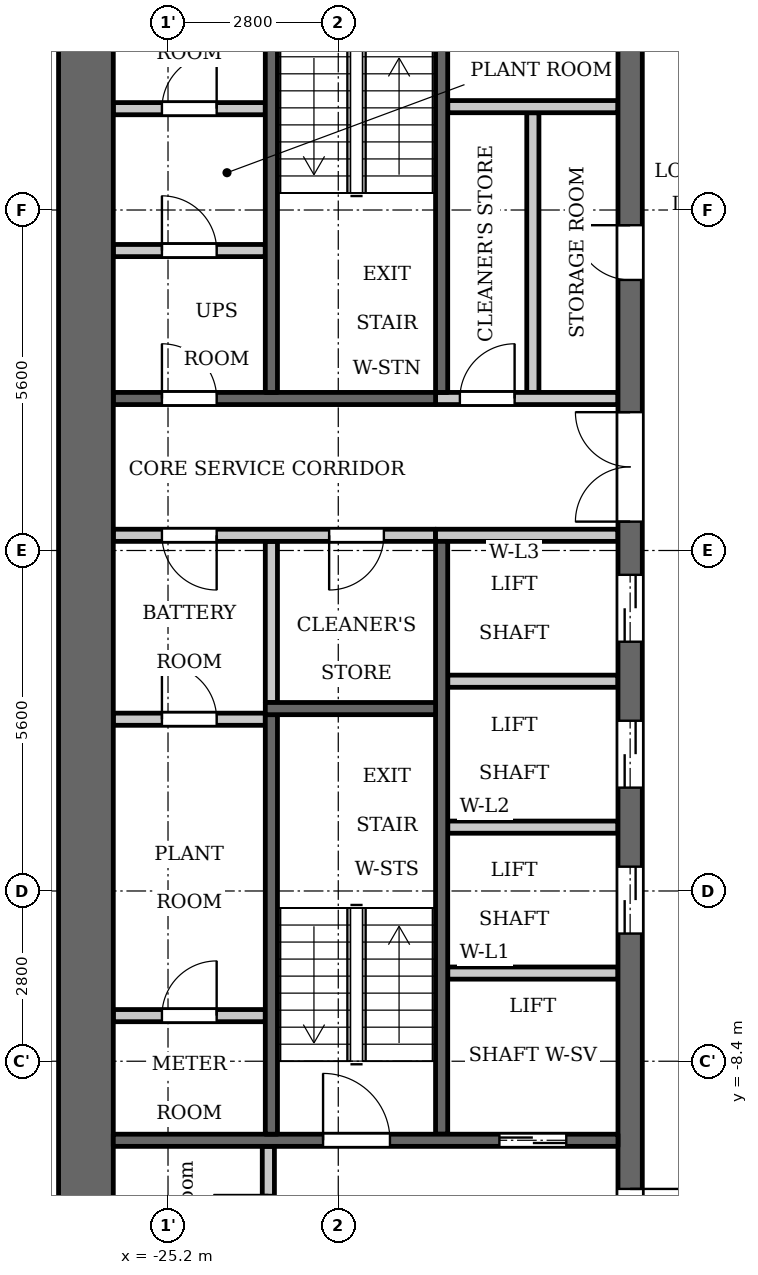
"""IFC4 building model, lengths in metres.
Left out: names, types, materials, properties, quantities, classifications, styles, units other than length and angle.
Written with IfcOpenShell. Run it as: python <this file> out.ifc"""

import sys

from ifc_helpers import new_model, si_unit, direction, frame, frame_2d, origin, place, context, subcontext, project, spatial, rectangle, extrude, element, fill, save


model = new_model("IFC4")
c1 = context("Model", 3, precision=1e-05, world=origin(), true_north=direction((0.0, 1.0)))
c2 = subcontext(c1, "Body", "Model", "MODEL_VIEW")
j1 = project(units=[si_unit("LENGTHUNIT", "METRE"), si_unit("PLANEANGLEUNIT", "RADIAN")], contexts=[c1])
p1 = place(None, origin())
s1 = spatial("IfcSite", under=j1, at=p1, CompositionType="ELEMENT")
p2 = place(p1, origin())
s2 = spatial("IfcBuilding", under=s1, at=p2, CompositionType="ELEMENT")
p3 = place(p2, frame((0.0, 0.0, 44.5)))
s3 = spatial("IfcBuildingStorey", under=s2, at=p3, CompositionType="ELEMENT", Elevation=44.5)
p4 = place(p3, frame((-23.5, -2.5, 0.0), z_axis=(0.0, 0.0, 1.0), x_axis=(0.0, 1.0, 0.0)))
e1 = element("IfcWall", 1, at=p4, inside=s3, PredefinedType="PARTITIONING", context=c2, shape_type="SweptSolid", body=[
    extrude(rectangle(XDim=2.65, YDim=0.2, at=frame_2d((1.325, 0.0))), origin(), (0.0, 0.0, 1.0), 3.2),
])
p5 = place(p3, frame((-20.7, 2.6, 0.0), z_axis=(0.0, 0.0, 1.0), x_axis=(0.0, 1.0, 0.0)))
e2 = element("IfcWall", 2, at=p5, inside=s3, PredefinedType="SHEAR", context=c2, shape_type="SweptSolid", body=[
    extrude(rectangle(XDim=7.0, YDim=0.2, at=frame_2d((3.5, 0.0))), origin(), (0.0, 0.0, 1.0), 3.2),
])
p6 = place(p3, frame((-20.7, -9.6, 0.0), z_axis=(0.0, 0.0, 1.0), x_axis=(0.0, 1.0, 0.0)))
e3 = element("IfcWall", 3, at=p6, inside=s3, PredefinedType="SHEAR", context=c2, shape_type="SweptSolid", body=[
    extrude(rectangle(XDim=9.75, YDim=0.2, at=frame_2d((4.875, 0.0))), origin(), (0.0, 0.0, 1.0), 3.2),
])
p7 = place(p3, frame((-20.8, 2.5, 0.0), z_axis=(0.0, 0.0, 1.0), x_axis=(-1.0, 0.0, 0.0)))
e4 = element("IfcWall", 4, at=p7, inside=s3, PredefinedType="SHEAR", context=c2, shape_type="SweptSolid", body=[
    extrude(rectangle(XDim=5.3, YDim=0.2, at=frame_2d((2.65, 0.0))), origin(), (0.0, 0.0, 1.0), 3.2),
])
p8 = place(p7, frame((3.6, 0.0, 0.0)))
e5 = element("IfcOpeningElement", 5, at=p8, cuts=e4, PredefinedType="OPENING", context=c2, shape_type="SweptSolid", body=[
    extrude(rectangle(XDim=0.9, YDim=2.1, at=frame_2d((0.45, 1.05))), frame((0.0, 0.11, 0.0), z_axis=(0.0, -1.0, 0.0), x_axis=(1.0, 0.0, 0.0)), (0.0, 0.0, 1.0), 0.22),
])
p9 = place(p3, frame((-20.8, 0.25, 0.0), z_axis=(0.0, 0.0, 1.0), x_axis=(-1.0, 0.0, 0.0)))
e6 = element("IfcWall", 6, at=p9, inside=s3, PredefinedType="PARTITIONING", context=c2, shape_type="SweptSolid", body=[
    extrude(rectangle(XDim=5.3, YDim=0.2, at=frame_2d((2.65, 0.0))), origin(), (0.0, 0.0, 1.0), 3.2),
])
p10 = place(p9, frame((0.85, 0.0, 0.0)))
e7 = element("IfcOpeningElement", 7, at=p10, cuts=e6, PredefinedType="OPENING", context=c2, shape_type="SweptSolid", body=[
    extrude(rectangle(XDim=0.9, YDim=2.1, at=frame_2d((0.45, 1.05))), frame((0.0, 0.11, 0.0), z_axis=(0.0, -1.0, 0.0), x_axis=(1.0, 0.0, 0.0)), (0.0, 0.0, 1.0), 0.22),
])
p11 = place(p9, frame((3.6, 0.0, 0.0)))
e8 = element("IfcOpeningElement", 8, at=p11, cuts=e6, PredefinedType="OPENING", context=c2, shape_type="SweptSolid", body=[
    extrude(rectangle(XDim=0.9, YDim=2.1, at=frame_2d((0.45, 1.05))), frame((0.0, 0.11, 0.0), z_axis=(0.0, -1.0, 0.0), x_axis=(1.0, 0.0, 0.0)), (0.0, 0.0, 1.0), 0.22),
])
p12 = place(p3, frame((-19.2, 2.6, 0.0), z_axis=(0.0, 0.0, 1.0), x_axis=(0.0, 1.0, 0.0)))
e9 = element("IfcWall", 9, at=p12, inside=s3, PredefinedType="PARTITIONING", context=c2, shape_type="SweptSolid", body=[
    extrude(rectangle(XDim=4.6, YDim=0.2, at=frame_2d((2.3, 0.0))), origin(), (0.0, 0.0, 1.0), 3.2),
])
p13 = place(p3, frame((-17.6, -12.3, 0.0), z_axis=(0.0, 0.0, 1.0), x_axis=(0.0, 1.0, 0.0)))
e10 = element("IfcWall", 10, at=p13, inside=s3, PredefinedType="SHEAR", context=c2, shape_type="SweptSolid", body=[
    extrude(rectangle(XDim=24.6, YDim=0.4, at=frame_2d((12.3, 0.0))), origin(), (0.0, 0.0, 1.0), 3.2),
])
p14 = place(p13, frame((6.0, 0.0, 0.0)))
e11 = element("IfcOpeningElement", 11, at=p14, cuts=e10, PredefinedType="OPENING", context=c2, shape_type="SweptSolid", body=[
    extrude(rectangle(XDim=1.1, YDim=2.1, at=frame_2d((0.55, 1.05))), frame((0.0, 0.21, 0.0), z_axis=(0.0, -1.0, 0.0), x_axis=(1.0, 0.0, 0.0)), (0.0, 0.0, 1.0), 0.42),
])
p15 = place(p13, frame((8.4, 0.0, 0.0)))
e12 = element("IfcOpeningElement", 12, at=p15, cuts=e10, PredefinedType="OPENING", context=c2, shape_type="SweptSolid", body=[
    extrude(rectangle(XDim=1.1, YDim=2.1, at=frame_2d((0.55, 1.05))), frame((0.0, 0.21, 0.0), z_axis=(0.0, -1.0, 0.0), x_axis=(1.0, 0.0, 0.0)), (0.0, 0.0, 1.0), 0.42),
])
p16 = place(p13, frame((10.8, 0.0, 0.0)))
e13 = element("IfcOpeningElement", 13, at=p16, cuts=e10, PredefinedType="OPENING", context=c2, shape_type="SweptSolid", body=[
    extrude(rectangle(XDim=1.1, YDim=2.1, at=frame_2d((0.55, 1.05))), frame((0.0, 0.21, 0.0), z_axis=(0.0, -1.0, 0.0), x_axis=(1.0, 0.0, 0.0)), (0.0, 0.0, 1.0), 0.42),
])
p17 = place(p13, frame((16.75, 0.0, 0.0)))
e14 = element("IfcOpeningElement", 14, at=p17, cuts=e10, PredefinedType="OPENING", context=c2, shape_type="SweptSolid", body=[
    extrude(rectangle(XDim=0.9, YDim=2.1, at=frame_2d((0.45, 1.05))), frame((0.0, 0.21, 0.0), z_axis=(0.0, -1.0, 0.0), x_axis=(1.0, 0.0, 0.0)), (0.0, 0.0, 1.0), 0.42),
])
p18 = place(p13, frame((22.8, 0.0, 0.0)))
e15 = element("IfcOpeningElement", 15, at=p18, cuts=e10, PredefinedType="OPENING", context=c2, shape_type="SweptSolid", body=[
    extrude(rectangle(XDim=1.1, YDim=2.1, at=frame_2d((0.55, 1.05))), frame((0.0, 0.21, 0.0), z_axis=(0.0, -1.0, 0.0), x_axis=(1.0, 0.0, 0.0)), (0.0, 0.0, 1.0), 0.42),
])
p19 = place(p13, frame((0.7, 0.0, 0.0)))
e16 = element("IfcOpeningElement", 16, at=p19, cuts=e10, PredefinedType="OPENING", context=c2, shape_type="SweptSolid", body=[
    extrude(rectangle(XDim=1.1, YDim=2.1, at=frame_2d((0.55, 1.05))), frame((0.0, 0.21, 0.0), z_axis=(0.0, -1.0, 0.0), x_axis=(1.0, 0.0, 0.0)), (0.0, 0.0, 1.0), 0.42),
])
p20 = place(p13, frame((12.775, 0.0, 0.0)))
e17 = element("IfcOpeningElement", 17, at=p20, cuts=e10, PredefinedType="OPENING", context=c2, shape_type="SweptSolid", body=[
    extrude(rectangle(XDim=1.8, YDim=2.1, at=frame_2d((0.9, 1.05))), frame((0.0, 0.21, 0.0), z_axis=(0.0, -1.0, 0.0), x_axis=(1.0, 0.0, 0.0)), (0.0, 0.0, 1.0), 0.42),
])
p21 = place(p3, frame((-26.55, -12.3, 0.0), z_axis=(0.0, 0.0, 1.0), x_axis=(0.0, 1.0, 0.0)))
e18 = element("IfcWall", 18, at=p21, inside=s3, PredefinedType="SHEAR", context=c2, shape_type="SweptSolid", body=[
    extrude(rectangle(XDim=24.6, YDim=0.9, at=frame_2d((12.3, 0.0))), origin(), (0.0, 0.0, 1.0), 3.2),
])
p22 = place(p3, frame((-23.55, -12.3, 0.0), z_axis=(0.0, 0.0, 1.0), x_axis=(0.0, 1.0, 0.0)))
e19 = element("IfcWall", 19, at=p22, inside=s3, PredefinedType="PARTITIONING", context=c2, shape_type="SweptSolid", body=[
    extrude(rectangle(XDim=2.5, YDim=0.2, at=frame_2d((1.25, 0.0))), origin(), (0.0, 0.0, 1.0), 3.2),
])
p23 = place(p22, frame((0.8, 0.0, 0.0)))
e20 = element("IfcOpeningElement", 20, at=p23, cuts=e19, PredefinedType="OPENING", context=c2, shape_type="SweptSolid", body=[
    extrude(rectangle(XDim=0.9, YDim=2.1, at=frame_2d((0.45, 1.05))), frame((0.0, 0.11, 0.0), z_axis=(0.0, -1.0, 0.0), x_axis=(1.0, 0.0, 0.0)), (0.0, 0.0, 1.0), 0.22),
])
p24 = place(p3, frame((-23.6, -7.65, 0.0), z_axis=(0.0, 0.0, 1.0), x_axis=(-1.0, 0.0, 0.0)))
e21 = element("IfcWall", 21, at=p24, inside=s3, PredefinedType="PARTITIONING", context=c2, shape_type="SweptSolid", body=[
    extrude(rectangle(XDim=2.5, YDim=0.2, at=frame_2d((1.25, 0.0))), origin(), (0.0, 0.0, 1.0), 3.2),
])
p25 = place(p24, frame((0.8, 0.0, 0.0)))
e22 = element("IfcOpeningElement", 22, at=p25, cuts=e21, PredefinedType="OPENING", context=c2, shape_type="SweptSolid", body=[
    extrude(rectangle(XDim=0.9, YDim=2.1, at=frame_2d((0.45, 1.05))), frame((0.0, 0.11, 0.0), z_axis=(0.0, -1.0, 0.0), x_axis=(1.0, 0.0, 0.0)), (0.0, 0.0, 1.0), 0.22),
])
p26 = place(p3, frame((-23.6, -2.775, 0.0), z_axis=(0.0, 0.0, 1.0), x_axis=(-1.0, 0.0, 0.0)))
e23 = element("IfcWall", 23, at=p26, inside=s3, PredefinedType="PARTITIONING", context=c2, shape_type="SweptSolid", body=[
    extrude(rectangle(XDim=2.5, YDim=0.2, at=frame_2d((1.25, 0.0))), origin(), (0.0, 0.0, 1.0), 3.2),
])
p27 = place(p26, frame((0.8, 0.0, 0.0)))
e24 = element("IfcOpeningElement", 24, at=p27, cuts=e23, PredefinedType="OPENING", context=c2, shape_type="SweptSolid", body=[
    extrude(rectangle(XDim=0.9, YDim=2.1, at=frame_2d((0.45, 1.05))), frame((0.0, 0.11, 0.0), z_axis=(0.0, -1.0, 0.0), x_axis=(1.0, 0.0, 0.0)), (0.0, 0.0, 1.0), 0.22),
])
p28 = place(p3, frame((-23.6, 4.933, 0.0), z_axis=(0.0, 0.0, 1.0), x_axis=(-1.0, 0.0, 0.0)))
e25 = element("IfcWall", 25, at=p28, inside=s3, PredefinedType="PARTITIONING", context=c2, shape_type="SweptSolid", body=[
    extrude(rectangle(XDim=2.5, YDim=0.2, at=frame_2d((1.25, 0.0))), origin(), (0.0, 0.0, 1.0), 3.2),
])
p29 = place(p28, frame((0.8, 0.0, 0.0)))
e26 = element("IfcOpeningElement", 26, at=p29, cuts=e25, PredefinedType="OPENING", context=c2, shape_type="SweptSolid", body=[
    extrude(rectangle(XDim=0.9, YDim=2.1, at=frame_2d((0.45, 1.05))), frame((0.0, 0.11, 0.0), z_axis=(0.0, -1.0, 0.0), x_axis=(1.0, 0.0, 0.0)), (0.0, 0.0, 1.0), 0.22),
])
p30 = place(p3, frame((-23.6, 7.267, 0.0), z_axis=(0.0, 0.0, 1.0), x_axis=(-1.0, 0.0, 0.0)))
e27 = element("IfcWall", 27, at=p30, inside=s3, PredefinedType="PARTITIONING", context=c2, shape_type="SweptSolid", body=[
    extrude(rectangle(XDim=2.5, YDim=0.2, at=frame_2d((1.25, 0.0))), origin(), (0.0, 0.0, 1.0), 3.2),
])
p31 = place(p30, frame((0.8, 0.0, 0.0)))
e28 = element("IfcOpeningElement", 28, at=p31, cuts=e27, PredefinedType="OPENING", context=c2, shape_type="SweptSolid", body=[
    extrude(rectangle(XDim=0.9, YDim=2.1, at=frame_2d((0.45, 1.05))), frame((0.0, 0.11, 0.0), z_axis=(0.0, -1.0, 0.0), x_axis=(1.0, 0.0, 0.0)), (0.0, 0.0, 1.0), 0.22),
])
p32 = place(p3, frame((-17.8, -9.7, 0.0), z_axis=(0.0, 0.0, 1.0), x_axis=(-1.0, 0.0, 0.0)))
e29 = element("IfcWall", 29, at=p32, inside=s3, PredefinedType="SHEAR", context=c2, shape_type="SweptSolid", body=[
    extrude(rectangle(XDim=8.3, YDim=0.2, at=frame_2d((4.15, 0.0))), origin(), (0.0, 0.0, 1.0), 3.2),
])
p33 = place(p32, frame((0.85, 0.0, 0.0)))
e30 = element("IfcOpeningElement", 30, at=p33, cuts=e29, PredefinedType="OPENING", context=c2, shape_type="SweptSolid", body=[
    extrude(rectangle(XDim=1.1, YDim=2.1, at=frame_2d((0.55, 1.05))), frame((0.0, 0.11, 0.0), z_axis=(0.0, -1.0, 0.0), x_axis=(1.0, 0.0, 0.0)), (0.0, 0.0, 1.0), 0.22),
])
p34 = place(p32, frame((3.75, 0.0, 0.0)))
e31 = element("IfcOpeningElement", 31, at=p34, cuts=e29, PredefinedType="OPENING", context=c2, shape_type="SweptSolid", body=[
    extrude(rectangle(XDim=1.1, YDim=2.1, at=frame_2d((0.55, 1.05))), frame((0.0, 0.11, 0.0), z_axis=(0.0, -1.0, 0.0), x_axis=(1.0, 0.0, 0.0)), (0.0, 0.0, 1.0), 0.22),
])
for number, where, z_axis, x_axis in (
    (32, (-17.8, -6.95, 0.0), (0.0, 0.0, 1.0), (-1.0, 0.0, 0.0)),
    (33, (-17.8, -4.55, 0.0), (0.0, 0.0, 1.0), (-1.0, 0.0, 0.0)),
    (34, (-17.8, -2.15, 0.0), (0.0, 0.0, 1.0), (-1.0, 0.0, 0.0)),
):
    element("IfcWall", number, at=place(p3, frame(where, z_axis=z_axis, x_axis=x_axis)), inside=s3, PredefinedType="PARTITIONING", context=c2, shape_type="SweptSolid", body=[
        extrude(rectangle(XDim=2.8, YDim=0.2, at=frame_2d((1.4, 0.0))), origin(), (0.0, 0.0, 1.0), 3.2),
    ])
p35 = place(p3, frame((-17.8, 0.25, 0.0), z_axis=(0.0, 0.0, 1.0), x_axis=(-1.0, 0.0, 0.0)))
e35 = element("IfcWall", 35, at=p35, inside=s3, PredefinedType="PARTITIONING", context=c2, shape_type="SweptSolid", body=[
    extrude(rectangle(XDim=3.0, YDim=0.2, at=frame_2d((1.5, 0.0))), origin(), (0.0, 0.0, 1.0), 3.2),
])
p36 = place(p3, frame((-17.8, 2.5, 0.0), z_axis=(0.0, 0.0, 1.0), x_axis=(-1.0, 0.0, 0.0)))
e36 = element("IfcWall", 36, at=p36, inside=s3, PredefinedType="PARTITIONING", context=c2, shape_type="SweptSolid", body=[
    extrude(rectangle(XDim=3.0, YDim=0.2, at=frame_2d((1.5, 0.0))), origin(), (0.0, 0.0, 1.0), 3.2),
])
p37 = place(p36, frame((1.7, 0.0, 0.0)))
e37 = element("IfcOpeningElement", 37, at=p37, cuts=e36, PredefinedType="OPENING", context=c2, shape_type="SweptSolid", body=[
    extrude(rectangle(XDim=0.9, YDim=2.1, at=frame_2d((0.45, 1.05))), frame((0.0, 0.11, 0.0), z_axis=(0.0, -1.0, 0.0), x_axis=(1.0, 0.0, 0.0)), (0.0, 0.0, 1.0), 0.22),
])
p38 = place(p3, frame((-17.8, 7.3, 0.0), z_axis=(0.0, 0.0, 1.0), x_axis=(-1.0, 0.0, 0.0)))
e38 = element("IfcWall", 38, at=p38, inside=s3, PredefinedType="PARTITIONING", context=c2, shape_type="SweptSolid", body=[
    extrude(rectangle(XDim=2.8, YDim=0.2, at=frame_2d((1.4, 0.0))), origin(), (0.0, 0.0, 1.0), 3.2),
])
p39 = place(p3, frame((-23.5, 2.6, 0.0), z_axis=(0.0, 0.0, 1.0), x_axis=(0.0, 1.0, 0.0)))
e39 = element("IfcWall", 39, at=p39, inside=s3, PredefinedType="SHEAR", context=c2, shape_type="SweptSolid", body=[
    extrude(rectangle(XDim=7.0, YDim=0.2, at=frame_2d((3.5, 0.0))), origin(), (0.0, 0.0, 1.0), 3.2),
])
p40 = place(p3, frame((-23.5, -9.6, 0.0), z_axis=(0.0, 0.0, 1.0), x_axis=(0.0, 1.0, 0.0)))
e40 = element("IfcWall", 40, at=p40, inside=s3, PredefinedType="SHEAR", context=c2, shape_type="SweptSolid", body=[
    extrude(rectangle(XDim=6.9, YDim=0.2, at=frame_2d((3.45, 0.0))), origin(), (0.0, 0.0, 1.0), 3.2),
])
p41 = place(p3, frame((-20.8, -2.6, 0.0), z_axis=(0.0, 0.0, 1.0), x_axis=(-1.0, 0.0, 0.0)))
e41 = element("IfcWall", 41, at=p41, inside=s3, PredefinedType="SHEAR", context=c2, shape_type="SweptSolid", body=[
    extrude(rectangle(XDim=2.8, YDim=0.2, at=frame_2d((1.4, 0.0))), origin(), (0.0, 0.0, 1.0), 3.2),
])
p42 = place(p33, origin())
e42 = element("IfcDoor", 42, at=p42, inside=s3, OperationType="DOUBLE_DOOR_SLIDING", PredefinedType="DOOR", context=c2, shape_type="SweptSolid", body=[
    extrude(rectangle(XDim=1.1, YDim=2.1, at=frame_2d((0.55, 1.05))), frame((0.0, 0.025, 0.0), z_axis=(0.0, -1.0, 0.0), x_axis=(1.0, 0.0, 0.0)), (0.0, 0.0, 1.0), 0.05),
])
fill(e30, e42)
p43 = place(p14, origin())
e43 = element("IfcDoor", 43, at=p43, inside=s3, OperationType="DOUBLE_DOOR_SLIDING", PredefinedType="DOOR", context=c2, shape_type="SweptSolid", body=[
    extrude(rectangle(XDim=1.1, YDim=2.1, at=frame_2d((0.55, 1.05))), frame((0.0, 0.025, 0.0), z_axis=(0.0, -1.0, 0.0), x_axis=(1.0, 0.0, 0.0)), (0.0, 0.0, 1.0), 0.05),
])
fill(e11, e43)
p44 = place(p15, origin())
e44 = element("IfcDoor", 44, at=p44, inside=s3, OperationType="DOUBLE_DOOR_SLIDING", PredefinedType="DOOR", context=c2, shape_type="SweptSolid", body=[
    extrude(rectangle(XDim=1.1, YDim=2.1, at=frame_2d((0.55, 1.05))), frame((0.0, 0.025, 0.0), z_axis=(0.0, -1.0, 0.0), x_axis=(1.0, 0.0, 0.0)), (0.0, 0.0, 1.0), 0.05),
])
fill(e12, e44)
p45 = place(p16, origin())
e45 = element("IfcDoor", 45, at=p45, inside=s3, OperationType="DOUBLE_DOOR_SLIDING", PredefinedType="DOOR", context=c2, shape_type="SweptSolid", body=[
    extrude(rectangle(XDim=1.1, YDim=2.1, at=frame_2d((0.55, 1.05))), frame((0.0, 0.025, 0.0), z_axis=(0.0, -1.0, 0.0), x_axis=(1.0, 0.0, 0.0)), (0.0, 0.0, 1.0), 0.05),
])
fill(e13, e45)
p46 = place(p17, origin())
e46 = element("IfcDoor", 46, at=p46, inside=s3, OperationType="SINGLE_SWING_LEFT", PredefinedType="DOOR", context=c2, shape_type="SweptSolid", body=[
    extrude(rectangle(XDim=0.9, YDim=2.1, at=frame_2d((0.45, 1.05))), frame((0.0, 0.025, 0.0), z_axis=(0.0, -1.0, 0.0), x_axis=(1.0, 0.0, 0.0)), (0.0, 0.0, 1.0), 0.05),
])
fill(e14, e46)
p47 = place(p37, origin())
e47 = element("IfcDoor", 47, at=p47, inside=s3, OperationType="SINGLE_SWING_LEFT", PredefinedType="DOOR", context=c2, shape_type="SweptSolid", body=[
    extrude(rectangle(XDim=0.9, YDim=2.1, at=frame_2d((0.45, 1.05))), frame((0.0, 0.025, 0.0), z_axis=(0.0, -1.0, 0.0), x_axis=(1.0, 0.0, 0.0)), (0.0, 0.0, 1.0), 0.05),
])
fill(e37, e47)
p48 = place(p19, origin())
e48 = element("IfcDoor", 48, at=p48, inside=s3, OperationType="SINGLE_SWING_RIGHT", PredefinedType="DOOR", context=c2, shape_type="SweptSolid", body=[
    extrude(rectangle(XDim=1.1, YDim=2.1, at=frame_2d((0.55, 1.05))), frame((0.0, 0.025, 0.0), z_axis=(0.0, -1.0, 0.0), x_axis=(1.0, 0.0, 0.0)), (0.0, 0.0, 1.0), 0.05),
])
fill(e16, e48)
p49 = place(p34, origin())
e49 = element("IfcDoor", 49, at=p49, inside=s3, OperationType="SINGLE_SWING_RIGHT", PredefinedType="DOOR", context=c2, shape_type="SweptSolid", body=[
    extrude(rectangle(XDim=1.1, YDim=2.1, at=frame_2d((0.55, 1.05))), frame((0.0, 0.025, 0.0), z_axis=(0.0, -1.0, 0.0), x_axis=(1.0, 0.0, 0.0)), (0.0, 0.0, 1.0), 0.05),
])
fill(e31, e49)
p50 = place(p20, origin())
e50 = element("IfcDoor", 50, at=p50, inside=s3, OperationType="DOUBLE_DOOR_SINGLE_SWING", PredefinedType="DOOR", context=c2, shape_type="SweptSolid", body=[
    extrude(rectangle(XDim=1.8, YDim=2.1, at=frame_2d((0.9, 1.05))), frame((0.0, 0.025, 0.0), z_axis=(0.0, -1.0, 0.0), x_axis=(1.0, 0.0, 0.0)), (0.0, 0.0, 1.0), 0.05),
])
fill(e17, e50)
p51 = place(p10, origin())
e51 = element("IfcDoor", 51, at=p51, inside=s3, OperationType="SINGLE_SWING_LEFT", PredefinedType="DOOR", context=c2, shape_type="SweptSolid", body=[
    extrude(rectangle(XDim=0.9, YDim=2.1, at=frame_2d((0.45, 1.05))), frame((0.0, 0.025, 0.0), z_axis=(0.0, -1.0, 0.0), x_axis=(1.0, 0.0, 0.0)), (0.0, 0.0, 1.0), 0.05),
])
fill(e7, e51)
p52 = place(p25, origin())
e52 = element("IfcDoor", 52, at=p52, inside=s3, OperationType="SINGLE_SWING_LEFT", PredefinedType="DOOR", context=c2, shape_type="SweptSolid", body=[
    extrude(rectangle(XDim=0.9, YDim=2.1, at=frame_2d((0.45, 1.05))), frame((0.0, 0.025, 0.0), z_axis=(0.0, -1.0, 0.0), x_axis=(1.0, 0.0, 0.0)), (0.0, 0.0, 1.0), 0.05),
])
fill(e22, e52)
p53 = place(p27, origin())
e53 = element("IfcDoor", 53, at=p53, inside=s3, OperationType="SINGLE_SWING_RIGHT", PredefinedType="DOOR", context=c2, shape_type="SweptSolid", body=[
    extrude(rectangle(XDim=0.9, YDim=2.1, at=frame_2d((0.45, 1.05))), frame((0.0, 0.025, 0.0), z_axis=(0.0, -1.0, 0.0), x_axis=(1.0, 0.0, 0.0)), (0.0, 0.0, 1.0), 0.05),
])
fill(e24, e53)
p54 = place(p11, origin())
e54 = element("IfcDoor", 54, at=p54, inside=s3, OperationType="SINGLE_SWING_RIGHT", PredefinedType="DOOR", context=c2, shape_type="SweptSolid", body=[
    extrude(rectangle(XDim=0.9, YDim=2.1, at=frame_2d((0.45, 1.05))), frame((0.0, 0.025, 0.0), z_axis=(0.0, -1.0, 0.0), x_axis=(1.0, 0.0, 0.0)), (0.0, 0.0, 1.0), 0.05),
])
fill(e8, e54)
p55 = place(p29, origin())
e55 = element("IfcDoor", 55, at=p55, inside=s3, OperationType="SINGLE_SWING_RIGHT", PredefinedType="DOOR", context=c2, shape_type="SweptSolid", body=[
    extrude(rectangle(XDim=0.9, YDim=2.1, at=frame_2d((0.45, 1.05))), frame((0.0, 0.025, 0.0), z_axis=(0.0, -1.0, 0.0), x_axis=(1.0, 0.0, 0.0)), (0.0, 0.0, 1.0), 0.05),
])
fill(e26, e55)
p56 = place(p31, origin())
e56 = element("IfcDoor", 56, at=p56, inside=s3, OperationType="SINGLE_SWING_LEFT", PredefinedType="DOOR", context=c2, shape_type="SweptSolid", body=[
    extrude(rectangle(XDim=0.9, YDim=2.1, at=frame_2d((0.45, 1.05))), frame((0.0, 0.025, 0.0), z_axis=(0.0, -1.0, 0.0), x_axis=(1.0, 0.0, 0.0)), (0.0, 0.0, 1.0), 0.05),
])
fill(e28, e56)
p57 = place(p8, origin())
e57 = element("IfcDoor", 57, at=p57, inside=s3, OperationType="SINGLE_SWING_RIGHT", PredefinedType="DOOR", context=c2, shape_type="SweptSolid", body=[
    extrude(rectangle(XDim=0.9, YDim=2.1, at=frame_2d((0.45, 1.05))), frame((0.0, 0.025, 0.0), z_axis=(0.0, -1.0, 0.0), x_axis=(1.0, 0.0, 0.0)), (0.0, 0.0, 1.0), 0.05),
])
fill(e5, e57)
save(model, sys.argv[1])
